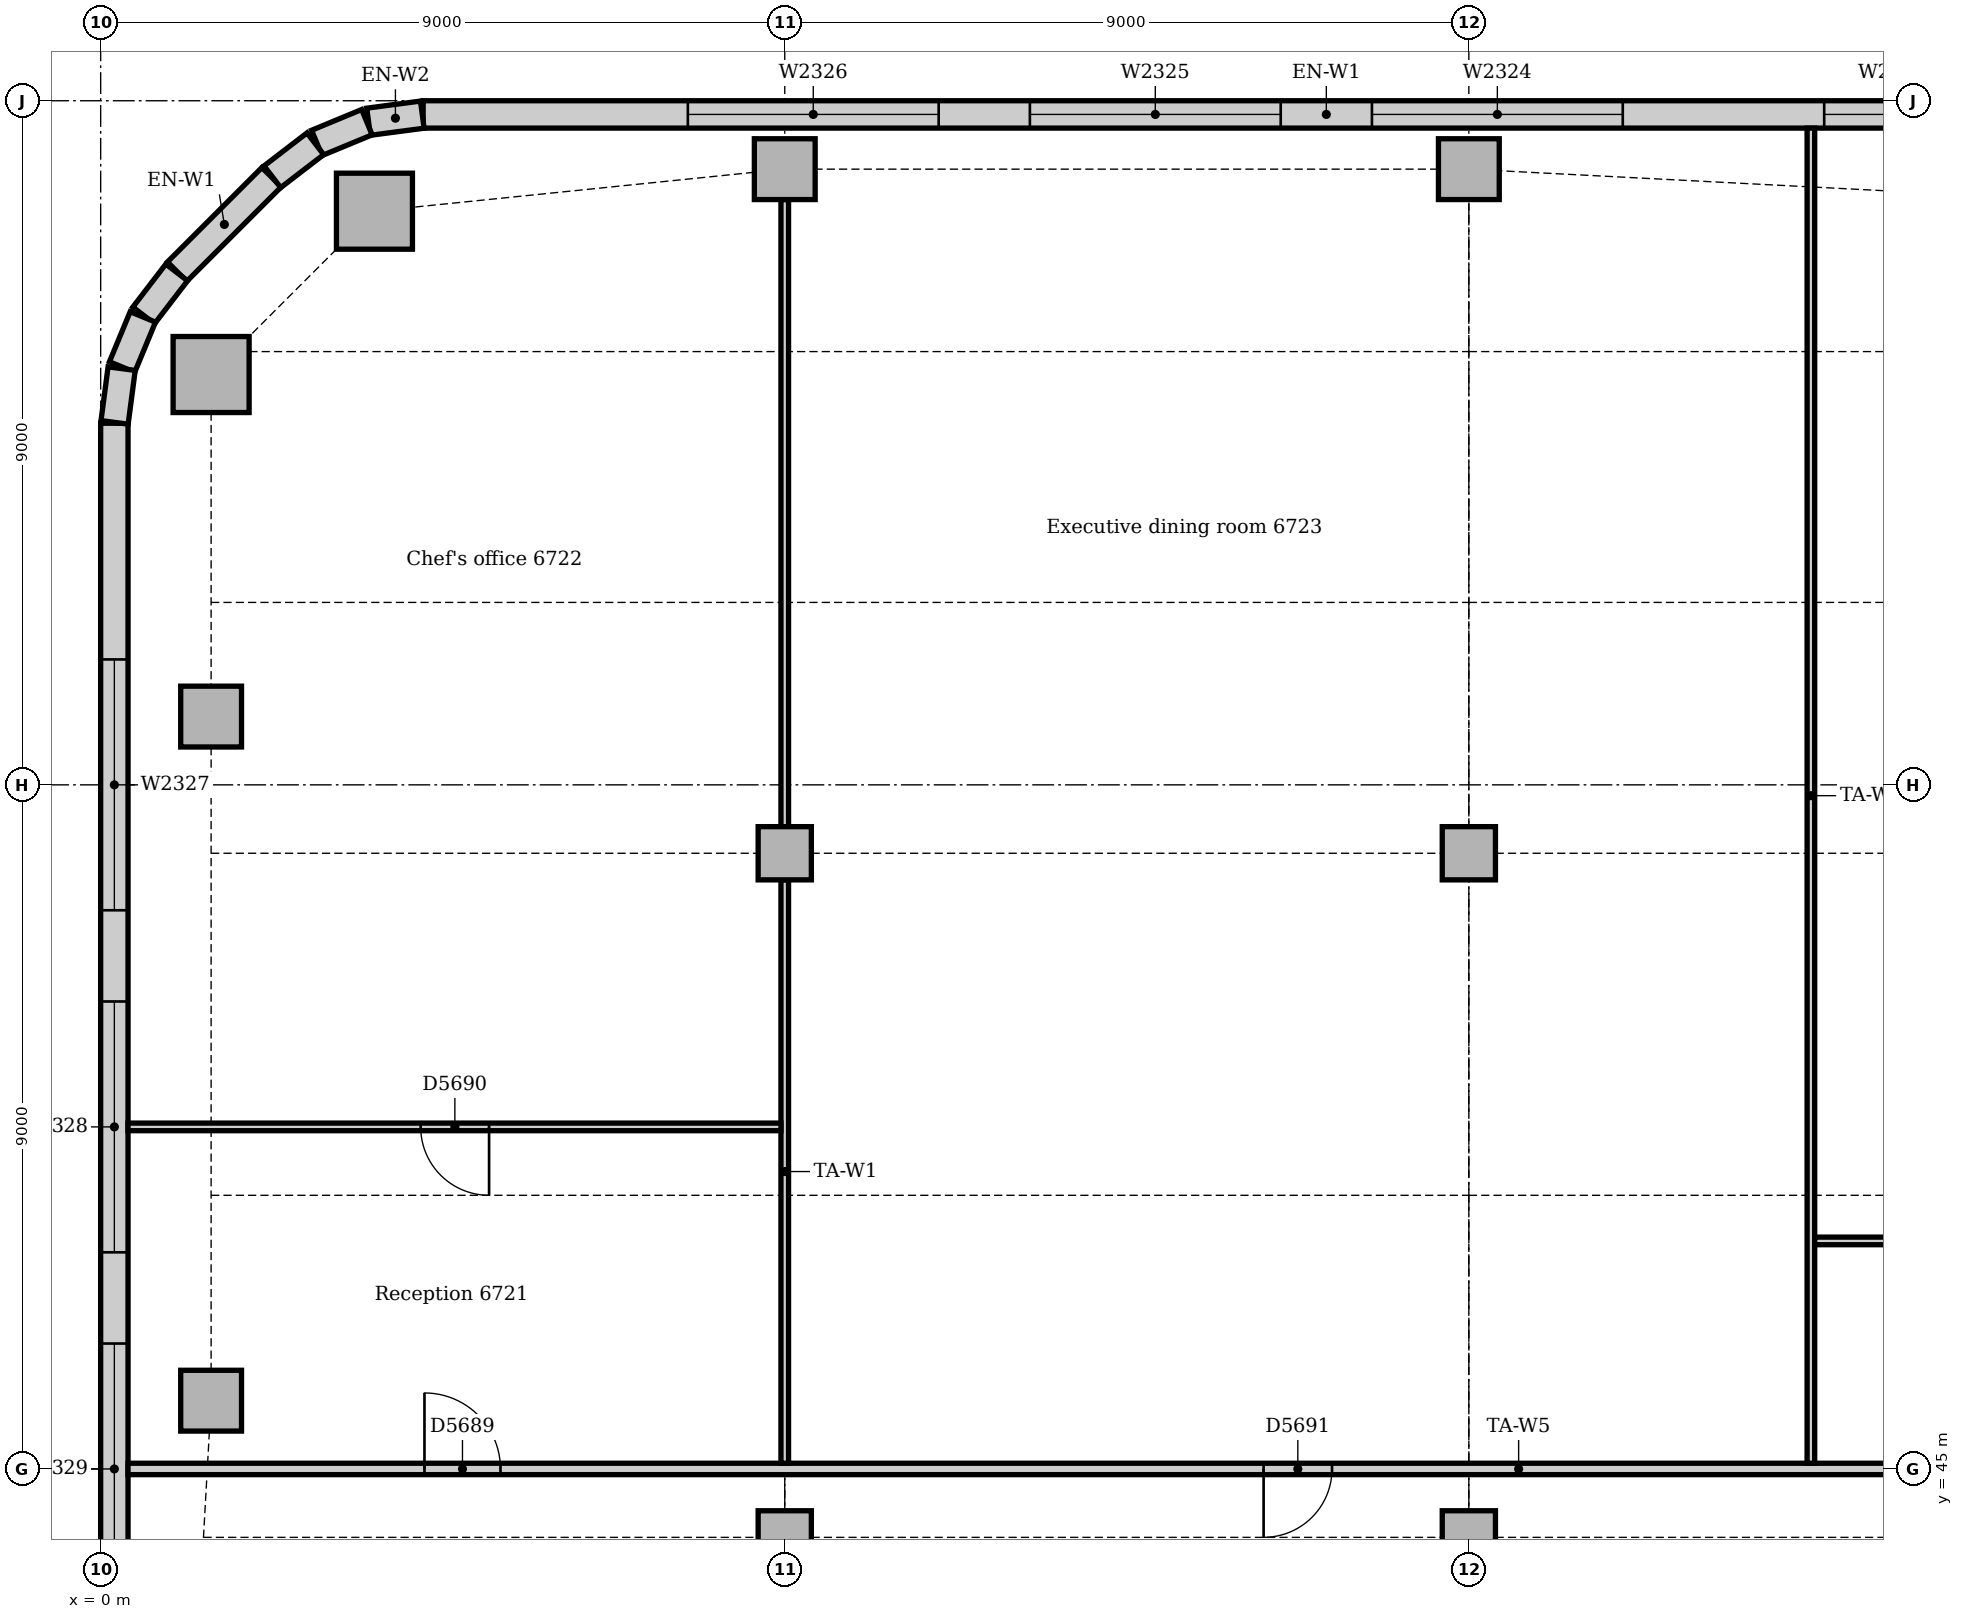
"""IFC4 building model, lengths in metres.
Left out: names, types, materials, properties, quantities, classifications, styles, units other than length and angle.
Written with IfcOpenShell. Run it as: python <this file> out.ifc"""

import sys

from ifc_helpers import new_model, si_unit, direction, frame, frame_2d, origin, origin_2d, place, context, subcontext, project, spatial, rectangle, extrude, element, fill, save


model = new_model("IFC4")
c1 = context("Model", 3, precision=1e-05, world=origin(), true_north=direction((0.0, 1.0)))
c2 = subcontext(c1, "Body", "Model", "MODEL_VIEW")
j1 = project(units=[si_unit("LENGTHUNIT", "METRE"), si_unit("PLANEANGLEUNIT", "RADIAN")], contexts=[c1])
p1 = place(None, origin())
s1 = spatial("IfcSite", under=j1, at=p1, CompositionType="ELEMENT")
p2 = place(p1, origin())
s2 = spatial("IfcBuilding", under=s1, at=p2, CompositionType="ELEMENT")
p3 = place(p2, frame((0.0, 0.0, 279.0)))
s3 = spatial("IfcBuildingStorey", under=s2, at=p3, CompositionType="ELEMENT", Elevation=279.0)
for number, where, z_axis, x_axis in (
    (1, (3.602, 61.547, 0.0), (0.0, 0.0, 1.0), (1.0, 0.0, 0.0)),
    (2, (1.453, 59.398, 0.0), (0.0, 0.0, 1.0), (1.0, 0.0, 0.0)),
):
    element("IfcColumn", number, at=place(p3, frame(where, z_axis=z_axis, x_axis=x_axis)), inside=s3, PredefinedType="COLUMN", context=c2, shape_type="SweptSolid", body=[
        extrude(rectangle(XDim=1.0, YDim=1.0, at=origin_2d()), origin(), (0.0, 0.0, 1.0), 3.8),
    ])
for number, where, z_axis, x_axis in (
    (3, (9.0, 62.1, 0.0), (0.0, 0.0, 1.0), (1.0, 0.0, 0.0)),
    (4, (18.0, 62.1, 0.0), (0.0, 0.0, 1.0), (1.0, 0.0, 0.0)),
    (5, (1.453, 45.898, 0.0), (0.0, 0.0, 1.0), (1.0, 0.0, 0.0)),
    (6, (1.453, 54.898, 0.0), (0.0, 0.0, 1.0), (1.0, 0.0, 0.0)),
):
    element("IfcColumn", number, at=place(p3, frame(where, z_axis=z_axis, x_axis=x_axis)), inside=s3, PredefinedType="COLUMN", context=c2, shape_type="SweptSolid", body=[
        extrude(rectangle(XDim=0.8, YDim=0.8, at=origin_2d()), origin(), (0.0, 0.0, 1.0), 3.8),
    ])
for number, where, z_axis, x_axis in (
    (7, (9.0, 44.1, 0.0), (0.0, 0.0, 1.0), (1.0, 0.0, 0.0)),
    (8, (9.0, 53.1, 0.0), (0.0, 0.0, 1.0), (1.0, 0.0, 0.0)),
    (9, (18.0, 44.1, 0.0), (0.0, 0.0, 1.0), (1.0, 0.0, 0.0)),
    (10, (18.0, 53.1, 0.0), (0.0, 0.0, 1.0), (1.0, 0.0, 0.0)),
):
    element("IfcColumn", number, at=place(p3, frame(where, z_axis=z_axis, x_axis=x_axis)), inside=s3, PredefinedType="COLUMN", context=c2, shape_type="SweptSolid", body=[
        extrude(rectangle(XDim=0.7, YDim=0.7, at=origin_2d()), origin(), (0.0, 0.0, 1.0), 3.8),
    ])
p4 = place(p3, frame((28.007, 62.82, 0.0), z_axis=(0.0, 0.0, 1.0), x_axis=(-1.0, 0.0, 0.0)))
e11 = element("IfcWall", 11, at=p4, inside=s3, PredefinedType="STANDARD", context=c2, shape_type="SweptSolid", body=[
    extrude(rectangle(XDim=23.765, YDim=0.36, at=frame_2d((11.882, 0.0))), origin(), (0.0, 0.0, 1.0), 3.8),
])
p5 = place(p4, frame((3.532, 0.0, 0.9)))
e12 = element("IfcOpeningElement", 12, at=p5, cuts=e11, PredefinedType="OPENING", context=c2, shape_type="SweptSolid", body=[
    extrude(rectangle(XDim=1.8, YDim=1.6, at=frame_2d((0.9, 0.8))), frame((0.0, 0.19, 0.0), z_axis=(0.0, -1.0, 0.0), x_axis=(1.0, 0.0, 0.0)), (0.0, 0.0, 1.0), 0.38),
])
p6 = place(p4, frame((7.982, 0.0, 0.9)))
e13 = element("IfcOpeningElement", 13, at=p6, cuts=e11, PredefinedType="OPENING", context=c2, shape_type="SweptSolid", body=[
    extrude(rectangle(XDim=3.3, YDim=1.6, at=frame_2d((1.65, 0.8))), frame((0.0, 0.19, 0.0), z_axis=(0.0, -1.0, 0.0), x_axis=(1.0, 0.0, 0.0)), (0.0, 0.0, 1.0), 0.38),
])
p7 = place(p4, frame((12.482, 0.0, 0.9)))
e14 = element("IfcOpeningElement", 14, at=p7, cuts=e11, PredefinedType="OPENING", context=c2, shape_type="SweptSolid", body=[
    extrude(rectangle(XDim=3.3, YDim=1.6, at=frame_2d((1.65, 0.8))), frame((0.0, 0.19, 0.0), z_axis=(0.0, -1.0, 0.0), x_axis=(1.0, 0.0, 0.0)), (0.0, 0.0, 1.0), 0.38),
])
p8 = place(p4, frame((16.982, 0.0, 0.9)))
e15 = element("IfcOpeningElement", 15, at=p8, cuts=e11, PredefinedType="OPENING", context=c2, shape_type="SweptSolid", body=[
    extrude(rectangle(XDim=3.3, YDim=1.6, at=frame_2d((1.65, 0.8))), frame((0.0, 0.19, 0.0), z_axis=(0.0, -1.0, 0.0), x_axis=(1.0, 0.0, 0.0)), (0.0, 0.0, 1.0), 0.38),
])
p9 = place(p3, frame((2.249, 61.994, 0.0), z_axis=(0.0, 0.0, 1.0), x_axis=(-0.707106781187, -0.707106781187, 0.0)))
e16 = element("IfcWall", 16, at=p9, inside=s3, PredefinedType="STANDARD", context=c2, shape_type="SweptSolid", body=[
    extrude(rectangle(XDim=1.757, YDim=0.36, at=frame_2d((0.879, 0.0))), origin(), (0.0, 0.0, 1.0), 3.8),
])
p10 = place(p3, frame((0.18, 58.757, 0.0), z_axis=(0.0, 0.0, 1.0), x_axis=(0.0, -1.0, 0.0)))
e17 = element("IfcWall", 17, at=p10, inside=s3, PredefinedType="STANDARD", context=c2, shape_type="SweptSolid", body=[
    extrude(rectangle(XDim=16.757, YDim=0.36, at=frame_2d((8.379, 0.0))), origin(), (0.0, 0.0, 1.0), 3.8),
])
p11 = place(p10, frame((3.107, 0.0, 0.9)))
e18 = element("IfcOpeningElement", 18, at=p11, cuts=e17, PredefinedType="OPENING", context=c2, shape_type="SweptSolid", body=[
    extrude(rectangle(XDim=3.3, YDim=1.6, at=frame_2d((1.65, 0.8))), frame((0.0, 0.19, 0.0), z_axis=(0.0, -1.0, 0.0), x_axis=(1.0, 0.0, 0.0)), (0.0, 0.0, 1.0), 0.38),
])
p12 = place(p10, frame((7.607, 0.0, 0.9)))
e19 = element("IfcOpeningElement", 19, at=p12, cuts=e17, PredefinedType="OPENING", context=c2, shape_type="SweptSolid", body=[
    extrude(rectangle(XDim=3.3, YDim=1.6, at=frame_2d((1.65, 0.8))), frame((0.0, 0.19, 0.0), z_axis=(0.0, -1.0, 0.0), x_axis=(1.0, 0.0, 0.0)), (0.0, 0.0, 1.0), 0.38),
])
p13 = place(p10, frame((12.107, 0.0, 0.9)))
e20 = element("IfcOpeningElement", 20, at=p13, cuts=e17, PredefinedType="OPENING", context=c2, shape_type="SweptSolid", body=[
    extrude(rectangle(XDim=3.3, YDim=1.6, at=frame_2d((1.65, 0.8))), frame((0.0, 0.19, 0.0), z_axis=(0.0, -1.0, 0.0), x_axis=(1.0, 0.0, 0.0)), (0.0, 0.0, 1.0), 0.38),
])
for number, where, z_axis, x_axis in (
    (21, (4.231, 62.817, 0.0), (0.0, 0.0, 1.0), (-0.991, -0.131, 0.0)),
    (22, (3.503, 62.718, 0.0), (0.0, 0.0, 1.0), (-0.924, -0.383, 0.0)),
):
    element("IfcWall", number, at=place(p3, frame(where, z_axis=z_axis, x_axis=x_axis)), inside=s3, PredefinedType="STANDARD", context=c2, shape_type="SweptSolid", body=[
        extrude(rectangle(XDim=0.713, YDim=0.36, at=frame_2d((0.356, 0.0))), origin(), (0.0, 0.0, 1.0), 3.8),
    ])
for number, where, z_axis, x_axis in (
    (23, (2.825, 62.434, 0.0), (0.0, 0.0, 1.0), (-0.793, -0.609, 0.0)),
    (24, (1.0, 60.741, 0.0), (0.0, 0.0, 1.0), (-0.609, -0.793, 0.0)),
):
    element("IfcWall", number, at=place(p3, frame(where, z_axis=z_axis, x_axis=x_axis)), inside=s3, PredefinedType="STANDARD", context=c2, shape_type="SweptSolid", body=[
        extrude(rectangle(XDim=0.713, YDim=0.36, at=frame_2d((0.357, 0.0))), origin(), (0.0, 0.0, 1.0), 3.8),
    ])
for number, where, z_axis, x_axis in (
    (25, (0.555, 60.156, 0.0), (0.0, 0.0, 1.0), (-0.383, -0.924, 0.0)),
    (26, (0.276, 59.476, 0.0), (0.0, 0.0, 1.0), (-0.131, -0.991, 0.0)),
):
    element("IfcWall", number, at=place(p3, frame(where, z_axis=z_axis, x_axis=x_axis)), inside=s3, PredefinedType="STANDARD", context=c2, shape_type="SweptSolid", body=[
        extrude(rectangle(XDim=0.713, YDim=0.36, at=frame_2d((0.356, 0.0))), origin(), (0.0, 0.0, 1.0), 3.8),
    ])
p14 = place(p3, frame((0.36, 45.0, 0.0), z_axis=(0.0, 0.0, 1.0), x_axis=(1.0, 0.0, 0.0)))
e27 = element("IfcWall", 27, at=p14, inside=s3, PredefinedType="PARTITIONING", context=c2, shape_type="SweptSolid", body=[
    extrude(rectangle(XDim=36.59, YDim=0.15, at=frame_2d((18.295, 0.0))), origin(), (0.0, 0.0, 1.0), 3.8),
])
p15 = place(p14, frame((3.9, 0.0, 0.0)))
e28 = element("IfcOpeningElement", 28, at=p15, cuts=e27, PredefinedType="OPENING", context=c2, shape_type="SweptSolid", body=[
    extrude(rectangle(XDim=1.0, YDim=2.1, at=frame_2d((0.5, 1.05))), frame((0.0, 0.085, 0.0), z_axis=(0.0, -1.0, 0.0), x_axis=(1.0, 0.0, 0.0)), (0.0, 0.0, 1.0), 0.17),
])
p16 = place(p14, frame((14.94, 0.0, 0.0)))
e29 = element("IfcOpeningElement", 29, at=p16, cuts=e27, PredefinedType="OPENING", context=c2, shape_type="SweptSolid", body=[
    extrude(rectangle(XDim=0.9, YDim=2.1, at=frame_2d((0.45, 1.05))), frame((0.0, 0.085, 0.0), z_axis=(0.0, -1.0, 0.0), x_axis=(1.0, 0.0, 0.0)), (0.0, 0.0, 1.0), 0.17),
])
p17 = place(p14, frame((28.79, 0.0, 0.0)))
e30 = element("IfcOpeningElement", 30, at=p17, cuts=e27, PredefinedType="OPENING", context=c2, shape_type="SweptSolid", body=[
    extrude(rectangle(XDim=1.0, YDim=2.1, at=frame_2d((0.5, 1.05))), frame((0.0, 0.085, 0.0), z_axis=(0.0, -1.0, 0.0), x_axis=(1.0, 0.0, 0.0)), (0.0, 0.0, 1.0), 0.17),
])
p18 = place(p3, frame((9.0, 45.075, 0.0), z_axis=(0.0, 0.0, 1.0), x_axis=(0.0, 1.0, 0.0)))
e31 = element("IfcWall", 31, at=p18, inside=s3, PredefinedType="PARTITIONING", context=c2, shape_type="SweptSolid", body=[
    extrude(rectangle(XDim=7.675, YDim=0.1, at=frame_2d((3.837, 0.0))), origin(), (0.0, 0.0, 1.0), 3.35),
])
p19 = place(p3, frame((9.0, 53.45, 0.0), z_axis=(0.0, 0.0, 1.0), x_axis=(0.0, 1.0, 0.0)))
e32 = element("IfcWall", 32, at=p19, inside=s3, PredefinedType="PARTITIONING", context=c2, shape_type="SweptSolid", body=[
    extrude(rectangle(XDim=8.25, YDim=0.1, at=frame_2d((4.125, 0.0))), origin(), (0.0, 0.0, 1.0), 3.35),
])
p20 = place(p3, frame((22.5, 45.075, 0.0), z_axis=(0.0, 0.0, 1.0), x_axis=(0.0, 1.0, 0.0)))
e33 = element("IfcWall", 33, at=p20, inside=s3, PredefinedType="PARTITIONING", context=c2, shape_type="SweptSolid", body=[
    extrude(rectangle(XDim=17.565, YDim=0.1, at=frame_2d((8.783, 0.0))), origin(), (0.0, 0.0, 1.0), 3.8),
])
p21 = place(p3, frame((22.55, 48.0, 0.0), z_axis=(0.0, 0.0, 1.0), x_axis=(1.0, 0.0, 0.0)))
e34 = element("IfcWall", 34, at=p21, inside=s3, PredefinedType="PARTITIONING", context=c2, shape_type="SweptSolid", body=[
    extrude(rectangle(XDim=15.34, YDim=0.1, at=frame_2d((7.67, 0.0))), origin(), (0.0, 0.0, 1.0), 3.8),
])
p22 = place(p21, frame((7.2, 0.0, 0.0)))
e35 = element("IfcOpeningElement", 35, at=p22, cuts=e34, PredefinedType="OPENING", context=c2, shape_type="SweptSolid", body=[
    extrude(rectangle(XDim=0.9, YDim=2.1, at=frame_2d((0.45, 1.05))), frame((0.0, 0.06, 0.0), z_axis=(0.0, -1.0, 0.0), x_axis=(1.0, 0.0, 0.0)), (0.0, 0.0, 1.0), 0.12),
])
p23 = place(p3, frame((0.36, 49.5, 0.0), z_axis=(0.0, 0.0, 1.0), x_axis=(1.0, 0.0, 0.0)))
e36 = element("IfcWall", 36, at=p23, inside=s3, PredefinedType="PARTITIONING", context=c2, shape_type="SweptSolid", body=[
    extrude(rectangle(XDim=8.59, YDim=0.1, at=frame_2d((4.295, 0.0))), origin(), (0.0, 0.0, 1.0), 3.8),
])
p24 = place(p23, frame((3.85, 0.0, 0.0)))
e37 = element("IfcOpeningElement", 37, at=p24, cuts=e36, PredefinedType="OPENING", context=c2, shape_type="SweptSolid", body=[
    extrude(rectangle(XDim=0.9, YDim=2.1, at=frame_2d((0.45, 1.05))), frame((0.0, 0.06, 0.0), z_axis=(0.0, -1.0, 0.0), x_axis=(1.0, 0.0, 0.0)), (0.0, 0.0, 1.0), 0.12),
])
p25 = place(p5, origin())
e38 = element("IfcWindow", 38, at=p25, inside=s3, PartitioningType="SINGLE_PANEL", PredefinedType="WINDOW", context=c2, shape_type="SweptSolid", body=[
    extrude(rectangle(XDim=1.8, YDim=1.6, at=frame_2d((0.9, 0.8))), frame((0.0, 0.13, 0.0), z_axis=(0.0, -1.0, 0.0), x_axis=(1.0, 0.0, 0.0)), (0.0, 0.0, 1.0), 0.06),
])
fill(e12, e38)
p26 = place(p6, origin())
e39 = element("IfcWindow", 39, at=p26, inside=s3, PartitioningType="SINGLE_PANEL", PredefinedType="WINDOW", context=c2, shape_type="SweptSolid", body=[
    extrude(rectangle(XDim=3.3, YDim=1.6, at=frame_2d((1.65, 0.8))), frame((0.0, 0.13, 0.0), z_axis=(0.0, -1.0, 0.0), x_axis=(1.0, 0.0, 0.0)), (0.0, 0.0, 1.0), 0.06),
])
fill(e13, e39)
p27 = place(p7, origin())
e40 = element("IfcWindow", 40, at=p27, inside=s3, PartitioningType="SINGLE_PANEL", PredefinedType="WINDOW", context=c2, shape_type="SweptSolid", body=[
    extrude(rectangle(XDim=3.3, YDim=1.6, at=frame_2d((1.65, 0.8))), frame((0.0, 0.13, 0.0), z_axis=(0.0, -1.0, 0.0), x_axis=(1.0, 0.0, 0.0)), (0.0, 0.0, 1.0), 0.06),
])
fill(e14, e40)
p28 = place(p8, origin())
e41 = element("IfcWindow", 41, at=p28, inside=s3, PartitioningType="SINGLE_PANEL", PredefinedType="WINDOW", context=c2, shape_type="SweptSolid", body=[
    extrude(rectangle(XDim=3.3, YDim=1.6, at=frame_2d((1.65, 0.8))), frame((0.0, 0.13, 0.0), z_axis=(0.0, -1.0, 0.0), x_axis=(1.0, 0.0, 0.0)), (0.0, 0.0, 1.0), 0.06),
])
fill(e15, e41)
p29 = place(p11, origin())
e42 = element("IfcWindow", 42, at=p29, inside=s3, PartitioningType="SINGLE_PANEL", PredefinedType="WINDOW", context=c2, shape_type="SweptSolid", body=[
    extrude(rectangle(XDim=3.3, YDim=1.6, at=frame_2d((1.65, 0.8))), frame((0.0, 0.13, 0.0), z_axis=(0.0, -1.0, 0.0), x_axis=(1.0, 0.0, 0.0)), (0.0, 0.0, 1.0), 0.06),
])
fill(e18, e42)
p30 = place(p12, origin())
e43 = element("IfcWindow", 43, at=p30, inside=s3, PartitioningType="SINGLE_PANEL", PredefinedType="WINDOW", context=c2, shape_type="SweptSolid", body=[
    extrude(rectangle(XDim=3.3, YDim=1.6, at=frame_2d((1.65, 0.8))), frame((0.0, 0.13, 0.0), z_axis=(0.0, -1.0, 0.0), x_axis=(1.0, 0.0, 0.0)), (0.0, 0.0, 1.0), 0.06),
])
fill(e19, e43)
p31 = place(p13, origin())
e44 = element("IfcWindow", 44, at=p31, inside=s3, PartitioningType="SINGLE_PANEL", PredefinedType="WINDOW", context=c2, shape_type="SweptSolid", body=[
    extrude(rectangle(XDim=3.3, YDim=1.6, at=frame_2d((1.65, 0.8))), frame((0.0, 0.13, 0.0), z_axis=(0.0, -1.0, 0.0), x_axis=(1.0, 0.0, 0.0)), (0.0, 0.0, 1.0), 0.06),
])
fill(e20, e44)
p32 = place(p15, origin())
e45 = element("IfcDoor", 45, at=p32, inside=s3, OperationType="SINGLE_SWING_LEFT", PredefinedType="DOOR", context=c2, shape_type="SweptSolid", body=[
    extrude(rectangle(XDim=1.0, YDim=2.1, at=frame_2d((0.5, 1.05))), frame((0.0, 0.025, 0.0), z_axis=(0.0, -1.0, 0.0), x_axis=(1.0, 0.0, 0.0)), (0.0, 0.0, 1.0), 0.05),
])
fill(e28, e45)
p33 = place(p24, frame((0.9, 0.0, 0.0), z_axis=(0.0, 0.0, 1.0), x_axis=(-1.0, 0.0, 0.0)))
e46 = element("IfcDoor", 46, at=p33, inside=s3, OperationType="SINGLE_SWING_LEFT", PredefinedType="DOOR", context=c2, shape_type="SweptSolid", body=[
    extrude(rectangle(XDim=0.9, YDim=2.1, at=frame_2d((0.45, 1.05))), frame((0.0, 0.025, 0.0), z_axis=(0.0, -1.0, 0.0), x_axis=(1.0, 0.0, 0.0)), (0.0, 0.0, 1.0), 0.05),
])
fill(e37, e46)
p34 = place(p16, frame((0.9, 0.0, 0.0), z_axis=(0.0, 0.0, 1.0), x_axis=(-1.0, 0.0, 0.0)))
e47 = element("IfcDoor", 47, at=p34, inside=s3, OperationType="SINGLE_SWING_RIGHT", PredefinedType="DOOR", context=c2, shape_type="SweptSolid", body=[
    extrude(rectangle(XDim=0.9, YDim=2.1, at=frame_2d((0.45, 1.05))), frame((0.0, 0.025, 0.0), z_axis=(0.0, -1.0, 0.0), x_axis=(1.0, 0.0, 0.0)), (0.0, 0.0, 1.0), 0.05),
])
fill(e29, e47)
save(model, sys.argv[1])
